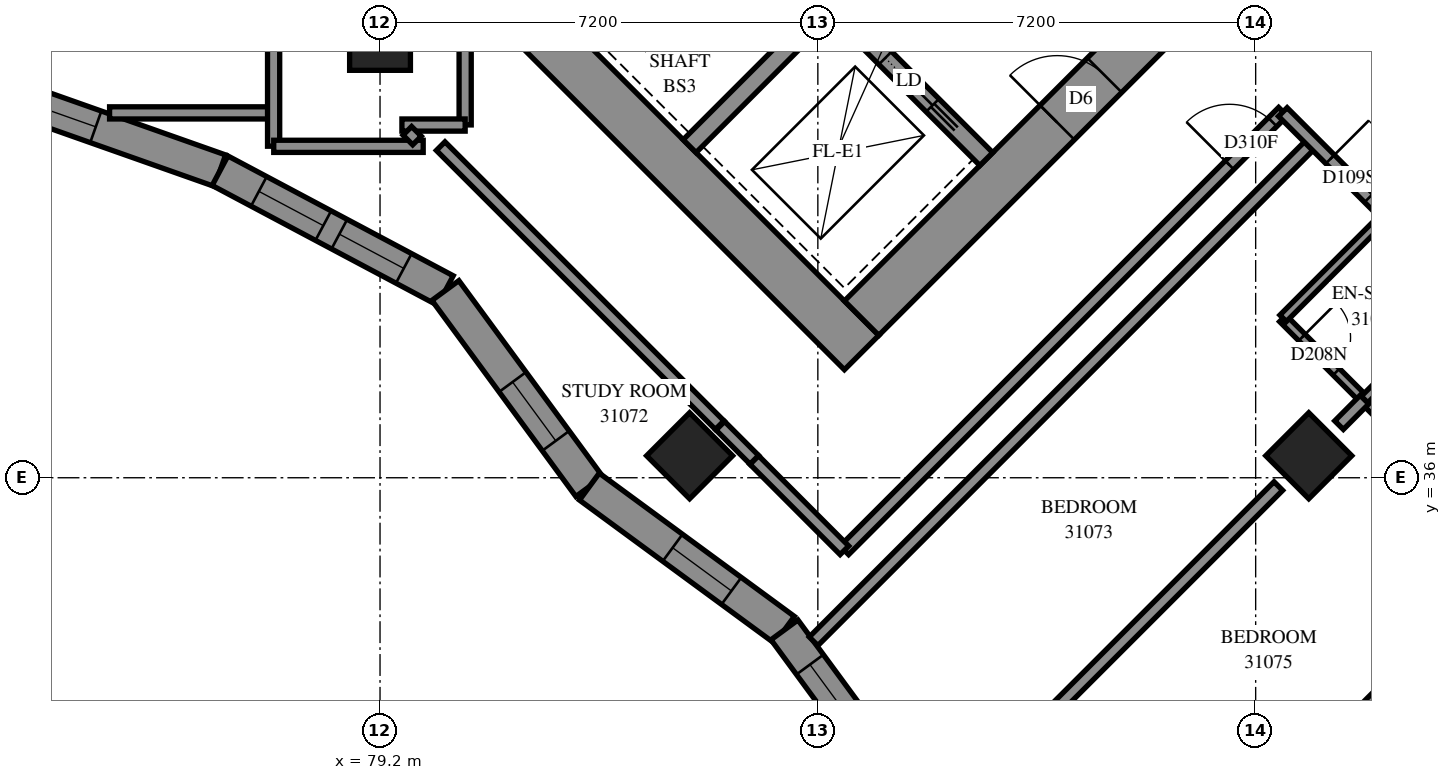
"""IFC4 building model, lengths in metres.
Left out: names, types, materials, properties, quantities, classifications, styles, units other than length and angle.
Written with IfcOpenShell. Run it as: python <this file> out.ifc"""

import sys

from ifc_helpers import new_model, si_unit, direction, frame, frame_2d, origin, origin_2d, place, context, subcontext, project, spatial, polyline, rectangle, outline, extrude, element, fill, save


model = new_model("IFC4")
c1 = context("Model", 3, precision=1e-05, world=origin(), true_north=direction((0.0, 1.0)))
c2 = subcontext(c1, "Body", "Model", "MODEL_VIEW")
j1 = project(units=[si_unit("LENGTHUNIT", "METRE"), si_unit("PLANEANGLEUNIT", "RADIAN")], contexts=[c1])
p1 = place(None, origin())
s1 = spatial("IfcSite", under=j1, at=p1, CompositionType="ELEMENT")
p2 = place(p1, origin())
s2 = spatial("IfcBuilding", under=s1, at=p2, CompositionType="ELEMENT")
p3 = place(p2, frame((0.0, 0.0, 115.2)))
s3 = spatial("IfcBuildingStorey", under=s2, at=p3, CompositionType="ELEMENT", Elevation=115.2)
for number, where, z_axis, x_axis in (
    (1, (79.2, 43.2, 0.0), (0.0, 0.0, 1.0), (1.0, 0.0, 0.0)),
    (2, (84.291, 36.362, 0.0), (0.0, 0.0, 1.0), (0.707, -0.707, 0.0)),
    (3, (94.474, 36.362, 0.0), (0.0, 0.0, 1.0), (0.707, -0.707, 0.0)),
):
    element("IfcColumn", number, at=place(p3, frame(where, z_axis=z_axis, x_axis=x_axis)), inside=s3, PredefinedType="COLUMN", context=c2, shape_type="SweptSolid", body=[
        extrude(rectangle(XDim=1.0, YDim=1.0, at=origin_2d()), origin(), (0.0, 0.0, 1.0), 3.1),
    ])
p4 = place(p3, frame((75.806, 49.373, -0.3), z_axis=(0.0, 0.0, 1.0), x_axis=(0.7071067812, -0.7071067812, 0.0)))
e4 = element("IfcWall", 4, at=p4, inside=s3, PredefinedType="SHEAR", context=c2, shape_type="SweptSolid", body=[
    extrude(rectangle(XDim=16.0, YDim=0.8, at=frame_2d((8.0, 0.0))), origin(), (0.0, 0.0, 1.0), 2.7),
])
p5 = place(p3, frame((87.12, 38.625, -0.3), z_axis=(0.0, 0.0, 1.0), x_axis=(0.7071067812, 0.7071067812, 0.0)))
e5 = element("IfcWall", 5, at=p5, inside=s3, PredefinedType="SHEAR", context=c2, shape_type="SweptSolid", body=[
    extrude(rectangle(XDim=14.4, YDim=0.8, at=frame_2d((7.2, 0.0))), origin(), (0.0, 0.0, 1.0), 2.7),
])
p6 = place(p5, frame((4.55, 0.0, 0.3)))
e6 = element("IfcOpeningElement", 6, at=p6, cuts=e5, PredefinedType="OPENING", context=c2, shape_type="SweptSolid", body=[
    extrude(rectangle(XDim=1.1, YDim=2.1, at=frame_2d((0.55, 1.05))), frame((0.0, 0.41, 0.0), z_axis=(0.0, -1.0, 0.0), x_axis=(1.0, 0.0, 0.0)), (0.0, 0.0, 1.0), 0.82),
])
p7 = place(p5, frame((11.35, 0.0, 0.3)))
e7 = element("IfcOpeningElement", 7, at=p7, cuts=e5, PredefinedType="OPENING", context=c2, shape_type="SweptSolid", body=[
    extrude(rectangle(XDim=1.1, YDim=2.1, at=frame_2d((0.55, 1.05))), frame((0.0, 0.41, 0.0), z_axis=(0.0, -1.0, 0.0), x_axis=(1.0, 0.0, 0.0)), (0.0, 0.0, 1.0), 0.82),
])
p8 = place(p3, frame((84.291, 41.453, 0.0), z_axis=(0.0, 0.0, 1.0), x_axis=(0.7071067812, 0.7071067812, 0.0)))
e8 = element("IfcWall", 8, at=p8, inside=s3, PredefinedType="SOLIDWALL", context=c2, shape_type="SweptSolid", body=[
    extrude(rectangle(XDim=3.3, YDim=0.3, at=frame_2d((1.65, 0.0))), origin(), (0.0, 0.0, 1.0), 3.1),
])
p9 = place(p3, frame((78.988, 51.423, 0.0), z_axis=(0.0, 0.0, 1.0), x_axis=(0.7071067812, -0.7071067812, 0.0)))
e9 = element("IfcWall", 9, at=p9, inside=s3, PredefinedType="SOLIDWALL", context=c2, shape_type="SweptSolid", body=[
    extrude(rectangle(XDim=14.4, YDim=0.3, at=frame_2d((7.2, 0.0))), origin(), (0.0, 0.0, 1.0), 3.1),
])
p10 = place(p9, frame((1.25, 0.0, 0.0)))
e10 = element("IfcOpeningElement", 10, at=p10, cuts=e9, PredefinedType="OPENING", context=c2, shape_type="SweptSolid", body=[
    extrude(rectangle(XDim=1.1, YDim=2.1, at=frame_2d((0.55, 1.05))), frame((0.0, 0.16, 0.0), z_axis=(0.0, -1.0, 0.0), x_axis=(1.0, 0.0, 0.0)), (0.0, 0.0, 1.0), 0.32),
])
p11 = place(p9, frame((4.85, 0.0, 0.0)))
e11 = element("IfcOpeningElement", 11, at=p11, cuts=e9, PredefinedType="OPENING", context=c2, shape_type="SweptSolid", body=[
    extrude(rectangle(XDim=1.1, YDim=2.1, at=frame_2d((0.55, 1.05))), frame((0.0, 0.16, 0.0), z_axis=(0.0, -1.0, 0.0), x_axis=(1.0, 0.0, 0.0)), (0.0, 0.0, 1.0), 0.32),
])
p12 = place(p9, frame((8.45, 0.0, 0.0)))
e12 = element("IfcOpeningElement", 12, at=p12, cuts=e9, PredefinedType="OPENING", context=c2, shape_type="SweptSolid", body=[
    extrude(rectangle(XDim=1.1, YDim=2.1, at=frame_2d((0.55, 1.05))), frame((0.0, 0.16, 0.0), z_axis=(0.0, -1.0, 0.0), x_axis=(1.0, 0.0, 0.0)), (0.0, 0.0, 1.0), 0.32),
])
p13 = place(p9, frame((12.05, 0.0, 0.0)))
e13 = element("IfcOpeningElement", 13, at=p13, cuts=e9, PredefinedType="OPENING", context=c2, shape_type="SweptSolid", body=[
    extrude(rectangle(XDim=1.1, YDim=2.1, at=frame_2d((0.55, 1.05))), frame((0.0, 0.16, 0.0), z_axis=(0.0, -1.0, 0.0), x_axis=(1.0, 0.0, 0.0)), (0.0, 0.0, 1.0), 0.32),
])
p14 = place(p3, frame((73.074, 42.283, 0.0), z_axis=(0.0, 0.0, 1.0), x_axis=(0.9429529685, -0.3329259665, 0.0)))
e14 = element("IfcWall", 14, at=p14, inside=s3, PredefinedType="SOLIDWALL", context=c2, shape_type="SweptSolid", body=[
    extrude(outline(polyline([(0.072, -0.275), (3.686, -0.275), (3.727, 0.275), (-0.072, 0.275), (0.072, -0.275)])), origin(), (0.0, 0.0, 1.0), 3.1),
])
p15 = place(p14, frame((0.34, 0.0, 0.5)))
e15 = element("IfcOpeningElement", 15, at=p15, cuts=e14, PredefinedType="OPENING", context=c2, shape_type="SweptSolid", body=[
    extrude(rectangle(XDim=1.2, YDim=2.45, at=frame_2d((0.6, 1.225))), frame((0.0, 0.285, 0.0), z_axis=(0.0, -1.0, 0.0), x_axis=(1.0, 0.0, 0.0)), (0.0, 0.0, 1.0), 0.57),
])
p16 = place(p3, frame((76.569, 41.05, 0.0), z_axis=(0.0, 0.0, 1.0), x_axis=(0.882964841, -0.4694391223, 0.0)))
e16 = element("IfcWall", 16, at=p16, inside=s3, PredefinedType="SOLIDWALL", context=c2, shape_type="SweptSolid", body=[
    extrude(outline(polyline([(0.021, -0.275), (4.135, -0.275), (4.26, 0.275), (-0.021, 0.275), (0.021, -0.275)])), origin(), (0.0, 0.0, 1.0), 3.1),
])
p17 = place(p16, frame((0.724, 0.0, 0.5)))
e17 = element("IfcOpeningElement", 17, at=p17, cuts=e16, PredefinedType="OPENING", context=c2, shape_type="SweptSolid", body=[
    extrude(rectangle(XDim=1.2, YDim=2.45, at=frame_2d((0.6, 1.225))), frame((0.0, 0.285, 0.0), z_axis=(0.0, -1.0, 0.0), x_axis=(1.0, 0.0, 0.0)), (0.0, 0.0, 1.0), 0.57),
])
p18 = place(p16, frame((2.223, 0.0, 0.5)))
e18 = element("IfcOpeningElement", 18, at=p18, cuts=e16, PredefinedType="OPENING", context=c2, shape_type="SweptSolid", body=[
    extrude(rectangle(XDim=1.2, YDim=2.45, at=frame_2d((0.6, 1.225))), frame((0.0, 0.285, 0.0), z_axis=(0.0, -1.0, 0.0), x_axis=(1.0, 0.0, 0.0)), (0.0, 0.0, 1.0), 0.57),
])
p19 = place(p3, frame((80.275, 39.079, 0.0), z_axis=(0.0, 0.0, 1.0), x_axis=(0.5918229872, -0.8060679573, 0.0)))
e19 = element("IfcWall", 19, at=p19, inside=s3, PredefinedType="SOLIDWALL", context=c2, shape_type="SweptSolid", body=[
    extrude(outline(polyline([(0.063, -0.275), (4.043, -0.275), (3.959, 0.275), (-0.063, 0.275), (0.063, -0.275)])), origin(), (0.0, 0.0, 1.0), 3.1),
])
p20 = place(p19, frame((1.867, 0.0, 0.5)))
e20 = element("IfcOpeningElement", 20, at=p20, cuts=e19, PredefinedType="OPENING", context=c2, shape_type="SweptSolid", body=[
    extrude(rectangle(XDim=1.2, YDim=2.45, at=frame_2d((0.6, 1.225))), frame((0.0, 0.285, 0.0), z_axis=(0.0, -1.0, 0.0), x_axis=(1.0, 0.0, 0.0)), (0.0, 0.0, 1.0), 0.57),
])
p21 = place(p3, frame((82.643, 35.854, 0.0), z_axis=(0.0, 0.0, 1.0), x_axis=(0.8060606099, -0.5918329943, 0.0)))
e21 = element("IfcWall", 21, at=p21, inside=s3, PredefinedType="SOLIDWALL", context=c2, shape_type="SweptSolid", body=[
    extrude(outline(polyline([(-0.042, -0.275), (3.938, -0.275), (4.022, 0.275), (0.042, 0.275), (-0.042, -0.275)])), origin(), (0.0, 0.0, 1.0), 3.1),
])
p22 = place(p21, frame((1.698, 0.0, 0.5)))
e22 = element("IfcOpeningElement", 22, at=p22, cuts=e21, PredefinedType="OPENING", context=c2, shape_type="SweptSolid", body=[
    extrude(rectangle(XDim=1.2, YDim=2.45, at=frame_2d((0.6, 1.225))), frame((0.0, 0.285, 0.0), z_axis=(0.0, -1.0, 0.0), x_axis=(1.0, 0.0, 0.0)), (0.0, 0.0, 1.0), 0.57),
])
p23 = place(p3, frame((85.851, 33.498, 0.0), z_axis=(0.0, 0.0, 1.0), x_axis=(0.5918329943, -0.8060606099, 0.0)))
e23 = element("IfcWall", 23, at=p23, inside=s3, PredefinedType="SOLIDWALL", context=c2, shape_type="SweptSolid", body=[
    extrude(outline(polyline([(0.042, -0.275), (4.022, -0.275), (3.938, 0.275), (-0.042, 0.275), (0.042, -0.275)])), origin(), (0.0, 0.0, 1.0), 3.1),
])
p24 = place(p23, frame((0.708, 0.0, 0.5)))
e24 = element("IfcOpeningElement", 24, at=p24, cuts=e23, PredefinedType="OPENING", context=c2, shape_type="SweptSolid", body=[
    extrude(rectangle(XDim=1.3, YDim=2.45, at=frame_2d((0.65, 1.225))), frame((0.0, 0.285, 0.0), z_axis=(0.0, -1.0, 0.0), x_axis=(1.0, 0.0, 0.0)), (0.0, 0.0, 1.0), 0.57),
])
p25 = place(p23, frame((2.208, 0.0, 0.5)))
e25 = element("IfcOpeningElement", 25, at=p25, cuts=e23, PredefinedType="OPENING", context=c2, shape_type="SweptSolid", body=[
    extrude(rectangle(XDim=1.3, YDim=2.45, at=frame_2d((0.65, 1.225))), frame((0.0, 0.285, 0.0), z_axis=(0.0, -1.0, 0.0), x_axis=(1.0, 0.0, 0.0)), (0.0, 0.0, 1.0), 0.57),
])
p26 = place(p3, frame((86.33, 33.311, 0.0), z_axis=(0.0, 0.0, 1.0), x_axis=(0.7071067812, 0.7071067812, 0.0)))
e26 = element("IfcWall", 26, at=p26, inside=s3, PredefinedType="PARTITIONING", context=c2, shape_type="SweptSolid", body=[
    extrude(rectangle(XDim=11.616, YDim=0.2, at=frame_2d((5.808, 0.0))), origin(), (0.0, 0.0, 1.0), 3.1),
])
p27 = place(p3, frame((91.451, 28.249, 0.0), z_axis=(0.0, 0.0, 1.0), x_axis=(0.7071067812, 0.7071067812, 0.0)))
e27 = element("IfcWall", 27, at=p27, inside=s3, PredefinedType="PARTITIONING", context=c2, shape_type="SweptSolid", body=[
    extrude(rectangle(XDim=11.574, YDim=0.2, at=frame_2d((5.787, 0.0))), origin(), (0.0, 0.0, 1.0), 3.1),
])
p28 = place(p3, frame((86.835, 34.806, 0.0), z_axis=(0.0, 0.0, 1.0), x_axis=(0.7071067812, 0.7071067812, 0.0)))
e28 = element("IfcWall", 28, at=p28, inside=s3, PredefinedType="PARTITIONING", context=c2, shape_type="SweptSolid", body=[
    extrude(rectangle(XDim=10.201, YDim=0.2, at=frame_2d((5.1, 0.0))), origin(), (0.0, 0.0, 1.0), 3.1),
])
p29 = place(p28, frame((8.959, 0.0, 0.0)))
e29 = element("IfcOpeningElement", 29, at=p29, cuts=e28, PredefinedType="OPENING", context=c2, shape_type="SweptSolid", body=[
    extrude(rectangle(XDim=1.0, YDim=2.1, at=frame_2d((0.5, 1.05))), frame((0.0, 0.11, 0.0), z_axis=(0.0, -1.0, 0.0), x_axis=(1.0, 0.0, 0.0)), (0.0, 0.0, 1.0), 0.22),
])
p30 = place(p3, frame((94.047, 42.015, 0.0), z_axis=(0.0, 0.0, 1.0), x_axis=(0.7071067812, -0.7071067812, 0.0)))
e30 = element("IfcWall", 30, at=p30, inside=s3, PredefinedType="PARTITIONING", context=c2, shape_type="SweptSolid", body=[
    extrude(rectangle(XDim=9.6, YDim=0.2, at=frame_2d((4.8, 0.0))), origin(), (0.0, 0.0, 1.0), 3.1),
])
p31 = place(p30, frame((1.099, 0.0, 0.0)))
e31 = element("IfcOpeningElement", 31, at=p31, cuts=e30, PredefinedType="OPENING", context=c2, shape_type="SweptSolid", body=[
    extrude(rectangle(XDim=0.9, YDim=2.1, at=frame_2d((0.45, 1.05))), frame((0.0, 0.11, 0.0), z_axis=(0.0, -1.0, 0.0), x_axis=(1.0, 0.0, 0.0)), (0.0, 0.0, 1.0), 0.22),
])
p32 = place(p30, frame((6.649, 0.0, 0.0)))
e32 = element("IfcOpeningElement", 32, at=p32, cuts=e30, PredefinedType="OPENING", context=c2, shape_type="SweptSolid", body=[
    extrude(rectangle(XDim=0.9, YDim=2.1, at=frame_2d((0.45, 1.05))), frame((0.0, 0.11, 0.0), z_axis=(0.0, -1.0, 0.0), x_axis=(1.0, 0.0, 0.0)), (0.0, 0.0, 1.0), 0.22),
])
p33 = place(p30, frame((8.3, 0.0, 0.0)))
e33 = element("IfcOpeningElement", 33, at=p33, cuts=e30, PredefinedType="OPENING", context=c2, shape_type="SweptSolid", body=[
    extrude(rectangle(XDim=0.9, YDim=2.1, at=frame_2d((0.45, 1.05))), frame((0.0, 0.11, 0.0), z_axis=(0.0, -1.0, 0.0), x_axis=(1.0, 0.0, 0.0)), (0.0, 0.0, 1.0), 0.22),
])
p34 = place(p3, frame((80.197, 41.453, 0.0), z_axis=(0.0, 0.0, 1.0), x_axis=(0.7071067812, -0.7071067812, 0.0)))
e34 = element("IfcWall", 34, at=p34, inside=s3, PredefinedType="PARTITIONING", context=c2, shape_type="SweptSolid", body=[
    extrude(rectangle(XDim=6.488, YDim=0.2, at=frame_2d((3.244, 0.0))), origin(), (0.0, 0.0, 1.0), 3.1),
])
p35 = place(p3, frame((89.881, 31.771, 0.0), z_axis=(0.0, 0.0, 1.0), x_axis=(0.7071067812, 0.7071067812, 0.0)))
e35 = element("IfcWall", 35, at=p35, inside=s3, PredefinedType="PARTITIONING", context=c2, shape_type="SweptSolid", body=[
    extrude(rectangle(XDim=5.787, YDim=0.2, at=frame_2d((2.893, 0.0))), origin(), (0.0, 0.0, 1.0), 3.1),
])
p36 = place(p3, frame((94.047, 38.621, 0.0), z_axis=(0.0, 0.0, 1.0), x_axis=(0.7071067812, -0.7071067812, 0.0)))
e36 = element("IfcWall", 36, at=p36, inside=s3, PredefinedType="PARTITIONING", context=c2, shape_type="SweptSolid", body=[
    extrude(rectangle(XDim=3.799, YDim=0.15, at=frame_2d((1.899, 0.0))), origin(), (0.0, 0.0, 1.0), 3.1),
])
p37 = place(p36, frame((0.444, 0.0, 0.0)))
e37 = element("IfcOpeningElement", 37, at=p37, cuts=e36, PredefinedType="OPENING", context=c2, shape_type="SweptSolid", body=[
    extrude(rectangle(XDim=0.8, YDim=2.1, at=frame_2d((0.4, 1.05))), frame((0.0, 0.085, 0.0), z_axis=(0.0, -1.0, 0.0), x_axis=(1.0, 0.0, 0.0)), (0.0, 0.0, 1.0), 0.17),
])
p38 = place(p36, frame((2.551, 0.0, 0.0)))
e38 = element("IfcOpeningElement", 38, at=p38, cuts=e36, PredefinedType="OPENING", context=c2, shape_type="SweptSolid", body=[
    extrude(rectangle(XDim=0.8, YDim=2.1, at=frame_2d((0.4, 1.05))), frame((0.0, 0.085, 0.0), z_axis=(0.0, -1.0, 0.0), x_axis=(1.0, 0.0, 0.0)), (0.0, 0.0, 1.0), 0.17),
])
p39 = place(p3, frame((74.752, 42.0, 0.0), z_axis=(0.0, 0.0, 1.0), x_axis=(1.0, 0.0, 0.0)))
e39 = element("IfcWall", 39, at=p39, inside=s3, PredefinedType="PARTITIONING", context=c2, shape_type="SweptSolid", body=[
    extrude(rectangle(XDim=2.698, YDim=0.2, at=frame_2d((1.349, 0.0))), origin(), (0.0, 0.0, 1.0), 3.1),
])
for number, where, z_axis, x_axis in (
    (40, (77.45, 41.452, 0.0), (0.0, 0.0, 1.0), (0.0, 1.0, 0.0)),
    (41, (77.452, 41.45, 0.0), (0.0, 0.0, 1.0), (1.0, 0.0, 0.0)),
):
    element("IfcWall", number, at=place(p3, frame(where, z_axis=z_axis, x_axis=x_axis)), inside=s3, PredefinedType="PARTITIONING", context=c2, shape_type="SweptSolid", body=[
        extrude(rectangle(XDim=2.458, YDim=0.2, at=frame_2d((1.229, 0.0))), origin(), (0.0, 0.0, 1.0), 3.1),
    ])
for number, where, z_axis, x_axis in (
    (42, (95.389, 37.285, 0.0), (0.0, 0.0, 1.0), (0.708, 0.707, 0.0)),
    (43, (94.052, 38.622, 0.0), (0.0, 0.0, 1.0), (0.707, 0.708, 0.0)),
):
    element("IfcWall", number, at=place(p3, frame(where, z_axis=z_axis, x_axis=x_axis)), inside=s3, PredefinedType="PARTITIONING", context=c2, shape_type="SweptSolid", body=[
        extrude(rectangle(XDim=2.4, YDim=0.15, at=frame_2d((1.2, 0.0))), origin(), (0.0, 0.0, 1.0), 3.1),
    ])
p40 = place(p3, frame((85.353, 36.293, 0.0), z_axis=(0.0, 0.0, 1.0), x_axis=(0.7066304548, -0.7075827869, 0.0)))
e44 = element("IfcWall", 44, at=p40, inside=s3, PredefinedType="PARTITIONING", context=c2, shape_type="SweptSolid", body=[
    extrude(rectangle(XDim=2.1, YDim=0.2, at=frame_2d((1.05, 0.0))), origin(), (0.0, 0.0, 1.0), 3.1),
])
p41 = place(p3, frame((80.6, 41.802, 0.0), z_axis=(0.0, 0.0, 1.0), x_axis=(0.0, 1.0, 0.0)))
e45 = element("IfcWall", 45, at=p41, inside=s3, PredefinedType="PARTITIONING", context=c2, shape_type="SweptSolid", body=[
    extrude(rectangle(XDim=2.098, YDim=0.2, at=frame_2d((1.049, 0.0))), origin(), (0.0, 0.0, 1.0), 3.1),
])
p42 = place(p3, frame((79.56, 41.8, 0.0), z_axis=(0.0, 0.0, 1.0), x_axis=(1.0, 0.0, 0.0)))
e46 = element("IfcWall", 46, at=p42, inside=s3, PredefinedType="PARTITIONING", context=c2, shape_type="SweptSolid", body=[
    extrude(rectangle(XDim=1.04, YDim=0.2, at=frame_2d((0.52, 0.0))), origin(), (0.0, 0.0, 1.0), 3.1),
])
p43 = place(p3, frame((84.795, 36.855, 0.0), z_axis=(0.0, 0.0, 1.0), x_axis=(0.7071067812, -0.7071067812, 0.0)))
e47 = element("IfcWall", 47, at=p43, inside=s3, PredefinedType="PARTITIONING", context=c2, shape_type="SweptSolid", body=[
    extrude(rectangle(XDim=0.792, YDim=0.2, at=frame_2d((0.396, 0.0))), origin(), (0.0, 0.0, 1.0), 3.1),
])
p44 = place(p3, frame((94.971, 36.865, 0.0), z_axis=(0.0, 0.0, 1.0), x_axis=(0.7054171665, 0.7087923682, 0.0)))
e48 = element("IfcWall", 48, at=p44, inside=s3, PredefinedType="PARTITIONING", context=c2, shape_type="SweptSolid", body=[
    extrude(rectangle(XDim=0.593, YDim=0.2, at=frame_2d((0.296, 0.0))), origin(), (0.0, 0.0, 1.0), 3.1),
])
p45 = place(p3, frame((79.649, 41.705, 0.0), z_axis=(0.0, 0.0, 1.0), x_axis=(0.7068844555, -0.707329037, 0.0)))
e49 = element("IfcWall", 49, at=p45, inside=s3, PredefinedType="PARTITIONING", context=c2, shape_type="SweptSolid", body=[
    extrude(rectangle(XDim=0.225, YDim=0.2, at=frame_2d((0.112, 0.0))), origin(), (0.0, 0.0, 1.0), 3.1),
])
p46 = place(p15, origin())
e50 = element("IfcWindow", 50, at=p46, inside=s3, PartitioningType="SINGLE_PANEL", PredefinedType="WINDOW", context=c2, shape_type="SweptSolid", body=[
    extrude(rectangle(XDim=1.2, YDim=2.45, at=frame_2d((0.6, 1.225))), frame((0.0, 0.155, 0.0), z_axis=(0.0, -1.0, 0.0), x_axis=(1.0, 0.0, 0.0)), (0.0, 0.0, 1.0), 0.06),
])
fill(e15, e50)
p47 = place(p17, origin())
e51 = element("IfcWindow", 51, at=p47, inside=s3, PartitioningType="SINGLE_PANEL", PredefinedType="WINDOW", context=c2, shape_type="SweptSolid", body=[
    extrude(rectangle(XDim=1.2, YDim=2.45, at=frame_2d((0.6, 1.225))), frame((0.0, 0.155, 0.0), z_axis=(0.0, -1.0, 0.0), x_axis=(1.0, 0.0, 0.0)), (0.0, 0.0, 1.0), 0.06),
])
fill(e17, e51)
p48 = place(p18, origin())
e52 = element("IfcWindow", 52, at=p48, inside=s3, PartitioningType="SINGLE_PANEL", PredefinedType="WINDOW", context=c2, shape_type="SweptSolid", body=[
    extrude(rectangle(XDim=1.2, YDim=2.45, at=frame_2d((0.6, 1.225))), frame((0.0, 0.155, 0.0), z_axis=(0.0, -1.0, 0.0), x_axis=(1.0, 0.0, 0.0)), (0.0, 0.0, 1.0), 0.06),
])
fill(e18, e52)
p49 = place(p20, origin())
e53 = element("IfcWindow", 53, at=p49, inside=s3, PartitioningType="SINGLE_PANEL", PredefinedType="WINDOW", context=c2, shape_type="SweptSolid", body=[
    extrude(rectangle(XDim=1.2, YDim=2.45, at=frame_2d((0.6, 1.225))), frame((0.0, 0.155, 0.0), z_axis=(0.0, -1.0, 0.0), x_axis=(1.0, 0.0, 0.0)), (0.0, 0.0, 1.0), 0.06),
])
fill(e20, e53)
p50 = place(p22, origin())
e54 = element("IfcWindow", 54, at=p50, inside=s3, PartitioningType="SINGLE_PANEL", PredefinedType="WINDOW", context=c2, shape_type="SweptSolid", body=[
    extrude(rectangle(XDim=1.2, YDim=2.45, at=frame_2d((0.6, 1.225))), frame((0.0, 0.155, 0.0), z_axis=(0.0, -1.0, 0.0), x_axis=(1.0, 0.0, 0.0)), (0.0, 0.0, 1.0), 0.06),
])
fill(e22, e54)
p51 = place(p24, origin())
e55 = element("IfcWindow", 55, at=p51, inside=s3, PartitioningType="SINGLE_PANEL", PredefinedType="WINDOW", context=c2, shape_type="SweptSolid", body=[
    extrude(rectangle(XDim=1.3, YDim=2.45, at=frame_2d((0.65, 1.225))), frame((0.0, 0.155, 0.0), z_axis=(0.0, -1.0, 0.0), x_axis=(1.0, 0.0, 0.0)), (0.0, 0.0, 1.0), 0.06),
])
fill(e24, e55)
p52 = place(p6, origin())
e56 = element("IfcDoor", 56, at=p52, inside=s3, OperationType="DOUBLE_DOOR_SINGLE_SWING", PredefinedType="DOOR", context=c2, shape_type="SweptSolid", body=[
    extrude(rectangle(XDim=1.1, YDim=2.1, at=frame_2d((0.55, 1.05))), frame((0.0, 0.025, 0.0), z_axis=(0.0, -1.0, 0.0), x_axis=(1.0, 0.0, 0.0)), (0.0, 0.0, 1.0), 0.05),
])
fill(e6, e56)
p53 = place(p13, origin())
e57 = element("IfcDoor", 57, at=p53, inside=s3, OperationType="SLIDING_TO_RIGHT", PredefinedType="DOOR", context=c2, shape_type="SweptSolid", body=[
    extrude(rectangle(XDim=1.1, YDim=2.1, at=frame_2d((0.55, 1.05))), frame((0.0, 0.025, 0.0), z_axis=(0.0, -1.0, 0.0), x_axis=(1.0, 0.0, 0.0)), (0.0, 0.0, 1.0), 0.05),
])
fill(e13, e57)
p54 = place(p29, origin())
e58 = element("IfcDoor", 58, at=p54, inside=s3, OperationType="SINGLE_SWING_LEFT", PredefinedType="DOOR", context=c2, shape_type="SweptSolid", body=[
    extrude(rectangle(XDim=1.0, YDim=2.1, at=frame_2d((0.5, 1.05))), frame((0.0, 0.025, 0.0), z_axis=(0.0, -1.0, 0.0), x_axis=(1.0, 0.0, 0.0)), (0.0, 0.0, 1.0), 0.05),
])
fill(e29, e58)
p55 = place(p31, origin())
e59 = element("IfcDoor", 59, at=p55, inside=s3, OperationType="SINGLE_SWING_LEFT", PredefinedType="DOOR", context=c2, shape_type="SweptSolid", body=[
    extrude(rectangle(XDim=0.9, YDim=2.1, at=frame_2d((0.45, 1.05))), frame((0.0, 0.025, 0.0), z_axis=(0.0, -1.0, 0.0), x_axis=(1.0, 0.0, 0.0)), (0.0, 0.0, 1.0), 0.05),
])
fill(e31, e59)
p56 = place(p37, origin())
e60 = element("IfcDoor", 60, at=p56, inside=s3, OperationType="SINGLE_SWING_RIGHT", PredefinedType="DOOR", context=c2, shape_type="SweptSolid", body=[
    extrude(rectangle(XDim=0.8, YDim=2.1, at=frame_2d((0.4, 1.05))), frame((0.0, 0.025, 0.0), z_axis=(0.0, -1.0, 0.0), x_axis=(1.0, 0.0, 0.0)), (0.0, 0.0, 1.0), 0.05),
])
fill(e37, e60)
save(model, sys.argv[1])
